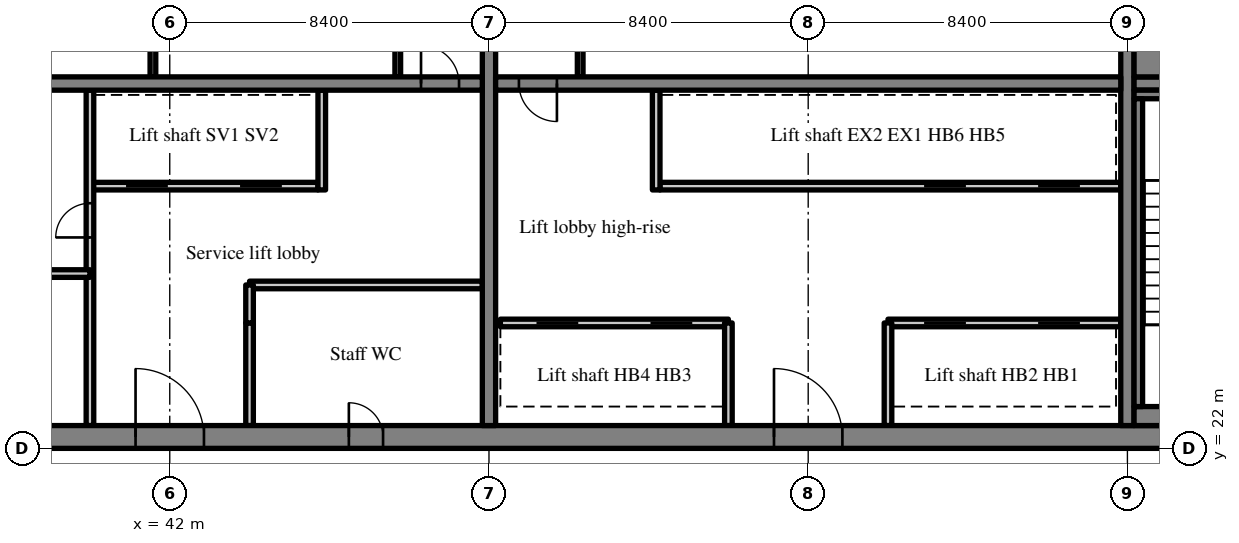
"""IFC4 building model, lengths in metres.
Left out: names, types, materials, properties, quantities, classifications, styles, units other than length and angle.
Written with IfcOpenShell. Run it as: python <this file> out.ifc"""

import sys

from ifc_helpers import new_model, si_unit, direction, frame, frame_2d, origin, place, context, subcontext, project, spatial, rectangle, extrude, source, transform, mapped, element, fill, save


model = new_model("IFC4")
c1 = context("Model", 3, precision=1e-05, world=origin(), true_north=direction((0.0, 1.0)))
c2 = subcontext(c1, "Body", "Model", "MODEL_VIEW")
j1 = project(units=[si_unit("LENGTHUNIT", "METRE"), si_unit("PLANEANGLEUNIT", "RADIAN")], contexts=[c1])
p1 = place(None, origin())
s1 = spatial("IfcSite", under=j1, at=p1, CompositionType="ELEMENT")
p2 = place(p1, origin())
s2 = spatial("IfcBuilding", under=s1, at=p2, CompositionType="ELEMENT")
p3 = place(p2, frame((0.0, 0.0, 229.6)))
s3 = spatial("IfcBuildingStorey", under=s2, at=p3, CompositionType="ELEMENT", Elevation=229.6)
m1 = source(origin(), c2, "Body", "SweptSolid", [
    extrude(rectangle(XDim=50.4, YDim=0.6, at=frame_2d((25.2, 0.0))), origin(), (0.0, 0.0, 1.0), 3.62),
])
p4 = place(p3, frame((25.2, 22.3, 0.0), z_axis=(0.0, 0.0, 1.0), x_axis=(1.0, 0.0, 0.0)))
e1 = element("IfcWall", 1, at=p4, inside=s3, PredefinedType="SHEAR", context=c2, shape_type="MappedRepresentation", body=[
    mapped(m1, transform((0.0, 0.0, 0.0), scale=1.0)),
])
m2 = source(origin(), c2, "Body", "SweptSolid", [
    extrude(rectangle(XDim=1.8, YDim=2.1, at=frame_2d((0.9, 1.05))), frame((0.0, 0.31, 0.0), z_axis=(0.0, -1.0, 0.0), x_axis=(1.0, 0.0, 0.0)), (0.0, 0.0, 1.0), 0.62),
])
p5 = place(p4, frame((15.9, 0.0, 0.0)))
e2 = element("IfcOpeningElement", 2, at=p5, cuts=e1, PredefinedType="OPENING", context=c2, shape_type="MappedRepresentation", body=[
    mapped(m2, transform((0.0, 0.0, 0.0), scale=1.0)),
])
m3 = source(origin(), c2, "Body", "SweptSolid", [
    extrude(rectangle(XDim=0.9, YDim=2.1, at=frame_2d((0.45, 1.05))), frame((0.0, 0.31, 0.0), z_axis=(0.0, -1.0, 0.0), x_axis=(1.0, 0.0, 0.0)), (0.0, 0.0, 1.0), 0.62),
])
p6 = place(p4, frame((11.187, 0.0, 0.0)))
e3 = element("IfcOpeningElement", 3, at=p6, cuts=e1, PredefinedType="OPENING", context=c2, shape_type="MappedRepresentation", body=[
    mapped(m3, transform((0.0, 0.0, 0.0), scale=1.0)),
])
p7 = place(p4, frame((21.513, 0.0, 0.0)))
e4 = element("IfcOpeningElement", 4, at=p7, cuts=e1, PredefinedType="OPENING", context=c2, shape_type="MappedRepresentation", body=[
    mapped(m3, transform((0.0, 0.0, 0.0), scale=1.0)),
])
p8 = place(p4, frame((32.7, 0.0, 0.0)))
e5 = element("IfcOpeningElement", 5, at=p8, cuts=e1, PredefinedType="OPENING", context=c2, shape_type="MappedRepresentation", body=[
    mapped(m2, transform((0.0, 0.0, 0.0), scale=1.0)),
])
m4 = source(origin(), c2, "Body", "SweptSolid", [
    extrude(rectangle(XDim=1.2, YDim=2.1, at=frame_2d((0.6, 1.05))), frame((0.0, 0.31, 0.0), z_axis=(0.0, -1.0, 0.0), x_axis=(1.0, 0.0, 0.0)), (0.0, 0.0, 1.0), 0.62),
])
p9 = place(p4, frame((6.488, 0.0, 0.0)))
e6 = element("IfcOpeningElement", 6, at=p9, cuts=e1, PredefinedType="OPENING", context=c2, shape_type="MappedRepresentation", body=[
    mapped(m4, transform((0.0, 0.0, 0.0), scale=1.0)),
])
p10 = place(p4, frame((47.925, 0.0, 0.0)))
e7 = element("IfcOpeningElement", 7, at=p10, cuts=e1, PredefinedType="OPENING", context=c2, shape_type="MappedRepresentation", body=[
    mapped(m4, transform((0.0, 0.0, 0.0), scale=1.0)),
])
m5 = source(origin(), c2, "Body", "SweptSolid", [
    extrude(rectangle(XDim=18.8, YDim=0.35, at=frame_2d((9.4, 0.0))), origin(), (0.0, 0.0, 1.0), 3.62),
])
p11 = place(p3, frame((50.4, 22.6, 0.0), z_axis=(0.0, 0.0, 1.0), x_axis=(0.0, 1.0, 0.0)))
e8 = element("IfcWall", 8, at=p11, inside=s3, PredefinedType="SHEAR", context=c2, shape_type="MappedRepresentation", body=[
    mapped(m5, transform((0.0, 0.0, 0.0), scale=1.0)),
])
m6 = source(origin(), c2, "Body", "SweptSolid", [
    extrude(rectangle(XDim=1.1, YDim=2.1, at=frame_2d((0.55, 1.05))), frame((0.0, 0.185, 0.0), z_axis=(0.0, -1.0, 0.0), x_axis=(1.0, 0.0, 0.0)), (0.0, 0.0, 1.0), 0.37),
])
p12 = place(p11, frame((12.85, 0.0, 0.0)))
e9 = element("IfcOpeningElement", 9, at=p12, cuts=e8, PredefinedType="OPENING", context=c2, shape_type="MappedRepresentation", body=[
    mapped(m6, transform((0.0, 0.0, 0.0), scale=1.0)),
])
p13 = place(p3, frame((67.2, 22.6, 0.0), z_axis=(0.0, 0.0, 1.0), x_axis=(0.0, 1.0, 0.0)))
e10 = element("IfcWall", 10, at=p13, inside=s3, PredefinedType="SHEAR", context=c2, shape_type="MappedRepresentation", body=[
    mapped(m5, transform((0.0, 0.0, 0.0), scale=1.0)),
])
m7 = source(origin(), c2, "Body", "SweptSolid", [
    extrude(rectangle(XDim=16.45, YDim=0.35, at=frame_2d((8.225, 0.0))), origin(), (0.0, 0.0, 1.0), 3.62),
])
p14 = place(p3, frame((33.775, 31.6, 0.0), z_axis=(0.0, 0.0, 1.0), x_axis=(1.0, 0.0, 0.0)))
e11 = element("IfcWall", 11, at=p14, inside=s3, PredefinedType="SHEAR", context=c2, shape_type="MappedRepresentation", body=[
    mapped(m7, transform((0.0, 0.0, 0.0), scale=1.0)),
])
m8 = source(origin(), c2, "Body", "SweptSolid", [
    extrude(rectangle(XDim=1.0, YDim=2.1, at=frame_2d((0.5, 1.05))), frame((0.0, 0.185, 0.0), z_axis=(0.0, -1.0, 0.0), x_axis=(1.0, 0.0, 0.0)), (0.0, 0.0, 1.0), 0.37),
])
p15 = place(p14, frame((14.837, 0.0, 0.0)))
e12 = element("IfcOpeningElement", 12, at=p15, cuts=e11, PredefinedType="OPENING", context=c2, shape_type="MappedRepresentation", body=[
    mapped(m8, transform((0.0, 0.0, 0.0), scale=1.0)),
])
m9 = source(origin(), c2, "Body", "SweptSolid", [
    extrude(rectangle(XDim=16.45, YDim=0.35, at=frame_2d((8.225, 0.0))), origin(), (0.0, 0.0, 1.0), 3.62),
])
p16 = place(p3, frame((50.575, 31.6, 0.0), z_axis=(0.0, 0.0, 1.0), x_axis=(1.0, 0.0, 0.0)))
e13 = element("IfcWall", 13, at=p16, inside=s3, PredefinedType="SHEAR", context=c2, shape_type="MappedRepresentation", body=[
    mapped(m9, transform((0.0, 0.0, 0.0), scale=1.0)),
])
p17 = place(p16, frame((0.613, 0.0, 0.0)))
e14 = element("IfcOpeningElement", 14, at=p17, cuts=e13, PredefinedType="OPENING", context=c2, shape_type="MappedRepresentation", body=[
    mapped(m8, transform((0.0, 0.0, 0.0), scale=1.0)),
])
m10 = source(origin(), c2, "Body", "SweptSolid", [
    extrude(rectangle(XDim=7.625, YDim=0.35, at=frame_2d((3.812, 0.0))), origin(), (0.0, 0.0, 1.0), 3.62),
])
p18 = place(p3, frame((67.375, 31.6, 0.0), z_axis=(0.0, 0.0, 1.0), x_axis=(1.0, 0.0, 0.0)))
e15 = element("IfcWall", 15, at=p18, inside=s3, PredefinedType="SHEAR", context=c2, shape_type="MappedRepresentation", body=[
    mapped(m10, transform((0.0, 0.0, 0.0), scale=1.0)),
])
p19 = place(p18, frame((5.8, 0.0, 0.0)))
e16 = element("IfcOpeningElement", 16, at=p19, cuts=e15, PredefinedType="OPENING", context=c2, shape_type="MappedRepresentation", body=[
    mapped(m6, transform((0.0, 0.0, 0.0), scale=1.0)),
])
m11 = source(origin(), c2, "Body", "SweptSolid", [
    extrude(rectangle(XDim=6.0, YDim=0.2, at=frame_2d((3.0, 0.0))), origin(), (0.0, 0.0, 1.0), 3.62),
])
p20 = place(p3, frame((39.9, 28.9, 0.0), z_axis=(0.0, 0.0, 1.0), x_axis=(1.0, 0.0, 0.0)))
e17 = element("IfcWall", 17, at=p20, inside=s3, PredefinedType="SOLIDWALL", context=c2, shape_type="MappedRepresentation", body=[
    mapped(m11, transform((0.0, 0.0, 0.0), scale=1.0)),
])
m12 = source(origin(), c2, "Body", "SweptSolid", [
    extrude(rectangle(XDim=1.1, YDim=2.1, at=frame_2d((0.55, 1.05))), frame((0.0, 0.11, 0.0), z_axis=(0.0, -1.0, 0.0), x_axis=(1.0, 0.0, 0.0)), (0.0, 0.0, 1.0), 0.22),
])
p21 = place(p20, frame((0.95, 0.0, 0.0)))
e18 = element("IfcOpeningElement", 18, at=p21, cuts=e17, PredefinedType="OPENING", context=c2, shape_type="MappedRepresentation", body=[
    mapped(m12, transform((0.0, 0.0, 0.0), scale=1.0)),
])
p22 = place(p20, frame((3.95, 0.0, 0.0)))
e19 = element("IfcOpeningElement", 19, at=p22, cuts=e17, PredefinedType="OPENING", context=c2, shape_type="MappedRepresentation", body=[
    mapped(m12, transform((0.0, 0.0, 0.0), scale=1.0)),
])
m13 = source(origin(), c2, "Body", "SweptSolid", [
    extrude(rectangle(XDim=8.825, YDim=0.2, at=frame_2d((4.413, 0.0))), origin(), (0.0, 0.0, 1.0), 3.62),
])
p23 = place(p3, frame((39.9, 22.6, 0.0), z_axis=(0.0, 0.0, 1.0), x_axis=(0.0, 1.0, 0.0)))
e20 = element("IfcWall", 20, at=p23, inside=s3, PredefinedType="PARTITIONING", context=c2, shape_type="MappedRepresentation", body=[
    mapped(m13, transform((0.0, 0.0, 0.0), scale=1.0)),
])
m14 = source(origin(), c2, "Body", "SweptSolid", [
    extrude(rectangle(XDim=0.9, YDim=2.1, at=frame_2d((0.45, 1.05))), frame((0.0, 0.11, 0.0), z_axis=(0.0, -1.0, 0.0), x_axis=(1.0, 0.0, 0.0)), (0.0, 0.0, 1.0), 0.22),
])
p24 = place(p23, frame((4.95, 0.0, 0.0)))
e21 = element("IfcOpeningElement", 21, at=p24, cuts=e20, PredefinedType="OPENING", context=c2, shape_type="MappedRepresentation", body=[
    mapped(m14, transform((0.0, 0.0, 0.0), scale=1.0)),
])
m15 = source(origin(), c2, "Body", "SweptSolid", [
    extrude(rectangle(XDim=2.7, YDim=0.2, at=frame_2d((1.35, 0.0))), origin(), (0.0, 0.0, 1.0), 3.62),
])
p25 = place(p3, frame((44.1, 22.6, 0.0), z_axis=(0.0, 0.0, 1.0), x_axis=(0.0, 1.0, 0.0)))
e22 = element("IfcWall", 22, at=p25, inside=s3, PredefinedType="PARTITIONING", context=c2, shape_type="MappedRepresentation", body=[
    mapped(m15, transform((0.0, 0.0, 0.0), scale=1.0)),
])
m16 = source(origin(), c2, "Body", "SweptSolid", [
    extrude(rectangle(XDim=2.625, YDim=0.2, at=frame_2d((1.312, 0.0))), origin(), (0.0, 0.0, 1.0), 3.62),
])
p26 = place(p3, frame((46.0, 28.8, 0.0), z_axis=(0.0, 0.0, 1.0), x_axis=(0.0, 1.0, 0.0)))
e23 = element("IfcWall", 23, at=p26, inside=s3, PredefinedType="SOLIDWALL", context=c2, shape_type="MappedRepresentation", body=[
    mapped(m16, transform((0.0, 0.0, 0.0), scale=1.0)),
])
m17 = source(origin(), c2, "Body", "SweptSolid", [
    extrude(rectangle(XDim=6.125, YDim=0.2, at=frame_2d((3.062, 0.0))), origin(), (0.0, 0.0, 1.0), 3.62),
])
for number, where, z_axis, x_axis in (
    (24, (33.775, 26.6, 0.0), (0.0, 0.0, 1.0), (1.0, 0.0, 0.0)),
    (25, (44.1, 26.3, 0.0), (0.0, 0.0, 1.0), (1.0, 0.0, 0.0)),
):
    element("IfcWall", number, at=place(p3, frame(where, z_axis=z_axis, x_axis=x_axis)), inside=s3, PredefinedType="PARTITIONING", context=c2, shape_type="MappedRepresentation", body=[
        mapped(m17, transform((0.0, 0.0, 0.0), scale=1.0)),
    ])
m18 = source(origin(), c2, "Body", "SweptSolid", [
    extrude(rectangle(XDim=1.0, YDim=0.2, at=frame_2d((0.5, 0.0))), origin(), (0.0, 0.0, 1.0), 3.62),
])
p27 = place(p3, frame((44.1, 25.3, 0.0), z_axis=(0.0, 0.0, 1.0), x_axis=(0.0, 1.0, 0.0)))
e26 = element("IfcWall", 26, at=p27, inside=s3, PredefinedType="PARTITIONING", context=c2, shape_type="MappedRepresentation", body=[
    mapped(m18, transform((0.0, 0.0, 0.0), scale=1.0)),
])
m19 = source(origin(), c2, "Body", "SweptSolid", [
    extrude(rectangle(XDim=3.225, YDim=0.15, at=frame_2d((1.613, 0.0))), origin(), (0.0, 0.0, 1.0), 3.62),
])
for number, where, z_axis, x_axis in (
    (27, (48.0, 31.775, 0.0), (0.0, 0.0, 1.0), (0.0, 1.0, 0.0)),
    (28, (41.557, 31.775, 0.0), (0.0, 0.0, 1.0), (0.0, 1.0, 0.0)),
):
    element("IfcWall", number, at=place(p3, frame(where, z_axis=z_axis, x_axis=x_axis)), inside=s3, PredefinedType="PARTITIONING", context=c2, shape_type="MappedRepresentation", body=[
        mapped(m19, transform((0.0, 0.0, 0.0), scale=1.0)),
    ])
p28 = place(p3, frame((67.025, 25.3, 0.0), z_axis=(0.0, 0.0, 1.0), x_axis=(-1.0, 0.0, 0.0)))
e29 = element("IfcWall", 29, at=p28, inside=s3, PredefinedType="SOLIDWALL", context=c2, shape_type="MappedRepresentation", body=[
    mapped(m17, transform((0.0, 0.0, 0.0), scale=1.0)),
])
p29 = place(p28, frame((1.075, 0.0, 0.0)))
e30 = element("IfcOpeningElement", 30, at=p29, cuts=e29, PredefinedType="OPENING", context=c2, shape_type="MappedRepresentation", body=[
    mapped(m12, transform((0.0, 0.0, 0.0), scale=1.0)),
])
p30 = place(p28, frame((4.075, 0.0, 0.0)))
e31 = element("IfcOpeningElement", 31, at=p30, cuts=e29, PredefinedType="OPENING", context=c2, shape_type="MappedRepresentation", body=[
    mapped(m12, transform((0.0, 0.0, 0.0), scale=1.0)),
])
p31 = place(p3, frame((56.7, 25.3, 0.0), z_axis=(0.0, 0.0, 1.0), x_axis=(-1.0, 0.0, 0.0)))
e32 = element("IfcWall", 32, at=p31, inside=s3, PredefinedType="SOLIDWALL", context=c2, shape_type="MappedRepresentation", body=[
    mapped(m11, transform((0.0, 0.0, 0.0), scale=1.0)),
])
p32 = place(p31, frame((0.95, 0.0, 0.0)))
e33 = element("IfcOpeningElement", 33, at=p32, cuts=e32, PredefinedType="OPENING", context=c2, shape_type="MappedRepresentation", body=[
    mapped(m12, transform((0.0, 0.0, 0.0), scale=1.0)),
])
p33 = place(p31, frame((3.95, 0.0, 0.0)))
e34 = element("IfcOpeningElement", 34, at=p33, cuts=e32, PredefinedType="OPENING", context=c2, shape_type="MappedRepresentation", body=[
    mapped(m12, transform((0.0, 0.0, 0.0), scale=1.0)),
])
m20 = source(origin(), c2, "Body", "SweptSolid", [
    extrude(rectangle(XDim=12.125, YDim=0.2, at=frame_2d((6.062, 0.0))), origin(), (0.0, 0.0, 1.0), 3.62),
])
p34 = place(p3, frame((67.025, 28.9, 0.0), z_axis=(0.0, 0.0, 1.0), x_axis=(-1.0, 0.0, 0.0)))
e35 = element("IfcWall", 35, at=p34, inside=s3, PredefinedType="SOLIDWALL", context=c2, shape_type="MappedRepresentation", body=[
    mapped(m20, transform((0.0, 0.0, 0.0), scale=1.0)),
])
p35 = place(p34, frame((1.075, 0.0, 0.0)))
e36 = element("IfcOpeningElement", 36, at=p35, cuts=e35, PredefinedType="OPENING", context=c2, shape_type="MappedRepresentation", body=[
    mapped(m12, transform((0.0, 0.0, 0.0), scale=1.0)),
])
p36 = place(p34, frame((4.075, 0.0, 0.0)))
e37 = element("IfcOpeningElement", 37, at=p36, cuts=e35, PredefinedType="OPENING", context=c2, shape_type="MappedRepresentation", body=[
    mapped(m12, transform((0.0, 0.0, 0.0), scale=1.0)),
])
for number, where, z_axis, x_axis in (
    (38, (60.9, 22.6, 0.0), (0.0, 0.0, 1.0), (0.0, 1.0, 0.0)),
    (39, (56.7, 22.6, 0.0), (0.0, 0.0, 1.0), (0.0, 1.0, 0.0)),
):
    element("IfcWall", number, at=place(p3, frame(where, z_axis=z_axis, x_axis=x_axis)), inside=s3, PredefinedType="SOLIDWALL", context=c2, shape_type="MappedRepresentation", body=[
        mapped(m15, transform((0.0, 0.0, 0.0), scale=1.0)),
    ])
p37 = place(p3, frame((54.8, 28.8, 0.0), z_axis=(0.0, 0.0, 1.0), x_axis=(0.0, 1.0, 0.0)))
e40 = element("IfcWall", 40, at=p37, inside=s3, PredefinedType="SOLIDWALL", context=c2, shape_type="MappedRepresentation", body=[
    mapped(m16, transform((0.0, 0.0, 0.0), scale=1.0)),
])
p38 = place(p3, frame((52.8, 31.775, 0.0), z_axis=(0.0, 0.0, 1.0), x_axis=(0.0, 1.0, 0.0)))
e41 = element("IfcWall", 41, at=p38, inside=s3, PredefinedType="PARTITIONING", context=c2, shape_type="MappedRepresentation", body=[
    mapped(m19, transform((0.0, 0.0, 0.0), scale=1.0)),
])
m21 = source(origin(), c2, "Body", "SweptSolid", [
    extrude(rectangle(XDim=4.875, YDim=0.5, at=frame_2d((2.438, 0.0))), origin(), (0.0, 0.0, 1.0), 3.62),
])
p39 = place(p3, frame((67.375, 22.85, 0.0), z_axis=(0.0, 0.0, 1.0), x_axis=(1.0, 0.0, 0.0)))
e42 = element("IfcWall", 42, at=p39, inside=s3, PredefinedType="SOLIDWALL", context=c2, shape_type="MappedRepresentation", body=[
    mapped(m21, transform((0.0, 0.0, 0.0), scale=1.0)),
])
m22 = source(origin(), c2, "Body", "SweptSolid", [
    extrude(rectangle(XDim=4.875, YDim=0.225, at=frame_2d((2.438, 0.0))), origin(), (0.0, 0.0, 1.0), 3.62),
])
p40 = place(p3, frame((67.375, 31.312, 0.0), z_axis=(0.0, 0.0, 1.0), x_axis=(1.0, 0.0, 0.0)))
e43 = element("IfcWall", 43, at=p40, inside=s3, PredefinedType="SOLIDWALL", context=c2, shape_type="MappedRepresentation", body=[
    mapped(m22, transform((0.0, 0.0, 0.0), scale=1.0)),
])
m23 = source(origin(), c2, "Body", "SweptSolid", [
    extrude(rectangle(XDim=8.1, YDim=0.225, at=frame_2d((4.05, 0.0))), origin(), (0.0, 0.0, 1.0), 3.62),
])
p41 = place(p3, frame((67.487, 23.1, 0.0), z_axis=(0.0, 0.0, 1.0), x_axis=(0.0, 1.0, 0.0)))
e44 = element("IfcWall", 44, at=p41, inside=s3, PredefinedType="SOLIDWALL", context=c2, shape_type="MappedRepresentation", body=[
    mapped(m23, transform((0.0, 0.0, 0.0), scale=1.0)),
])
m24 = source(origin(), c2, "Body", "SweptSolid", [
    extrude(rectangle(XDim=4.875, YDim=1.025, at=frame_2d((2.438, 0.0))), origin(), (0.0, 0.0, 1.0), 3.62),
])
p42 = place(p3, frame((67.375, 32.287, 0.0), z_axis=(0.0, 0.0, 1.0), x_axis=(1.0, 0.0, 0.0)))
e45 = element("IfcWall", 45, at=p42, inside=s3, PredefinedType="SOLIDWALL", context=c2, shape_type="MappedRepresentation", body=[
    mapped(m24, transform((0.0, 0.0, 0.0), scale=1.0)),
])
m25 = source(origin(), c2, "Body", "SweptSolid", [
    extrude(rectangle(XDim=1.8, YDim=2.1, at=frame_2d((0.9, 1.05))), frame((0.0, 0.225, 0.0), z_axis=(0.0, -1.0, 0.0), x_axis=(1.0, 0.0, 0.0)), (0.0, 0.0, 1.0), 0.05),
])
p43 = place(p5, origin())
e46 = element("IfcDoor", 46, at=p43, inside=s3, OperationType="DOUBLE_DOOR_SINGLE_SWING", PredefinedType="DOOR", context=c2, shape_type="MappedRepresentation", body=[
    mapped(m25, transform((0.0, 0.0, 0.0), scale=1.0)),
])
fill(e2, e46)
m26 = source(origin(), c2, "Body", "SweptSolid", [
    extrude(rectangle(XDim=1.0, YDim=2.1, at=frame_2d((0.5, 1.05))), frame((0.0, 0.025, 0.0), z_axis=(0.0, -1.0, 0.0), x_axis=(1.0, 0.0, 0.0)), (0.0, 0.0, 1.0), 0.05),
])
p44 = place(p15, origin())
e47 = element("IfcDoor", 47, at=p44, inside=s3, OperationType="SINGLE_SWING_LEFT", PredefinedType="DOOR", context=c2, shape_type="MappedRepresentation", body=[
    mapped(m26, transform((0.0, 0.0, 0.0), scale=1.0)),
])
fill(e12, e47)
m27 = source(origin(), c2, "Body", "SweptSolid", [
    extrude(rectangle(XDim=1.1, YDim=2.1, at=frame_2d((0.55, 1.05))), frame((0.0, 0.025, 0.0), z_axis=(0.0, -1.0, 0.0), x_axis=(1.0, 0.0, 0.0)), (0.0, 0.0, 1.0), 0.05),
])
p45 = place(p21, origin())
e48 = element("IfcDoor", 48, at=p45, inside=s3, OperationType="SLIDING_TO_LEFT", PredefinedType="DOOR", context=c2, shape_type="MappedRepresentation", body=[
    mapped(m27, transform((0.0, 0.0, 0.0), scale=1.0)),
])
fill(e18, e48)
p46 = place(p22, origin())
e49 = element("IfcDoor", 49, at=p46, inside=s3, OperationType="SLIDING_TO_RIGHT", PredefinedType="DOOR", context=c2, shape_type="MappedRepresentation", body=[
    mapped(m27, transform((0.0, 0.0, 0.0), scale=1.0)),
])
fill(e19, e49)
m28 = source(origin(), c2, "Body", "SweptSolid", [
    extrude(rectangle(XDim=0.9, YDim=2.1, at=frame_2d((0.45, 1.05))), frame((0.0, 0.025, 0.0), z_axis=(0.0, -1.0, 0.0), x_axis=(1.0, 0.0, 0.0)), (0.0, 0.0, 1.0), 0.05),
])
p47 = place(p24, origin())
e50 = element("IfcDoor", 50, at=p47, inside=s3, OperationType="SINGLE_SWING_LEFT", PredefinedType="DOOR", context=c2, shape_type="MappedRepresentation", body=[
    mapped(m28, transform((0.0, 0.0, 0.0), scale=1.0)),
])
fill(e21, e50)
m29 = source(origin(), c2, "Body", "SweptSolid", [
    extrude(rectangle(XDim=0.9, YDim=2.1, at=frame_2d((0.45, 1.05))), frame((0.0, 0.225, 0.0), z_axis=(0.0, -1.0, 0.0), x_axis=(1.0, 0.0, 0.0)), (0.0, 0.0, 1.0), 0.05),
])
p48 = place(p7, origin())
e51 = element("IfcDoor", 51, at=p48, inside=s3, OperationType="SINGLE_SWING_LEFT", PredefinedType="DOOR", context=c2, shape_type="MappedRepresentation", body=[
    mapped(m29, transform((0.0, 0.0, 0.0), scale=1.0)),
])
fill(e4, e51)
p49 = place(p8, origin())
e52 = element("IfcDoor", 52, at=p49, inside=s3, OperationType="DOUBLE_DOOR_SINGLE_SWING", PredefinedType="DOOR", context=c2, shape_type="MappedRepresentation", body=[
    mapped(m25, transform((0.0, 0.0, 0.0), scale=1.0)),
])
fill(e5, e52)
p50 = place(p17, origin())
e53 = element("IfcDoor", 53, at=p50, inside=s3, OperationType="SINGLE_SWING_RIGHT", PredefinedType="DOOR", context=c2, shape_type="MappedRepresentation", body=[
    mapped(m26, transform((0.0, 0.0, 0.0), scale=1.0)),
])
fill(e14, e53)
p51 = place(p29, origin())
e54 = element("IfcDoor", 54, at=p51, inside=s3, OperationType="SLIDING_TO_RIGHT", PredefinedType="DOOR", context=c2, shape_type="MappedRepresentation", body=[
    mapped(m27, transform((0.0, 0.0, 0.0), scale=1.0)),
])
fill(e30, e54)
p52 = place(p30, origin())
e55 = element("IfcDoor", 55, at=p52, inside=s3, OperationType="SLIDING_TO_LEFT", PredefinedType="DOOR", context=c2, shape_type="MappedRepresentation", body=[
    mapped(m27, transform((0.0, 0.0, 0.0), scale=1.0)),
])
fill(e31, e55)
p53 = place(p32, origin())
e56 = element("IfcDoor", 56, at=p53, inside=s3, OperationType="SLIDING_TO_RIGHT", PredefinedType="DOOR", context=c2, shape_type="MappedRepresentation", body=[
    mapped(m27, transform((0.0, 0.0, 0.0), scale=1.0)),
])
fill(e33, e56)
p54 = place(p33, origin())
e57 = element("IfcDoor", 57, at=p54, inside=s3, OperationType="SLIDING_TO_LEFT", PredefinedType="DOOR", context=c2, shape_type="MappedRepresentation", body=[
    mapped(m27, transform((0.0, 0.0, 0.0), scale=1.0)),
])
fill(e34, e57)
p55 = place(p35, origin())
e58 = element("IfcDoor", 58, at=p55, inside=s3, OperationType="SLIDING_TO_RIGHT", PredefinedType="DOOR", context=c2, shape_type="MappedRepresentation", body=[
    mapped(m27, transform((0.0, 0.0, 0.0), scale=1.0)),
])
fill(e36, e58)
p56 = place(p36, origin())
e59 = element("IfcDoor", 59, at=p56, inside=s3, OperationType="SLIDING_TO_LEFT", PredefinedType="DOOR", context=c2, shape_type="MappedRepresentation", body=[
    mapped(m27, transform((0.0, 0.0, 0.0), scale=1.0)),
])
fill(e37, e59)
save(model, sys.argv[1])
